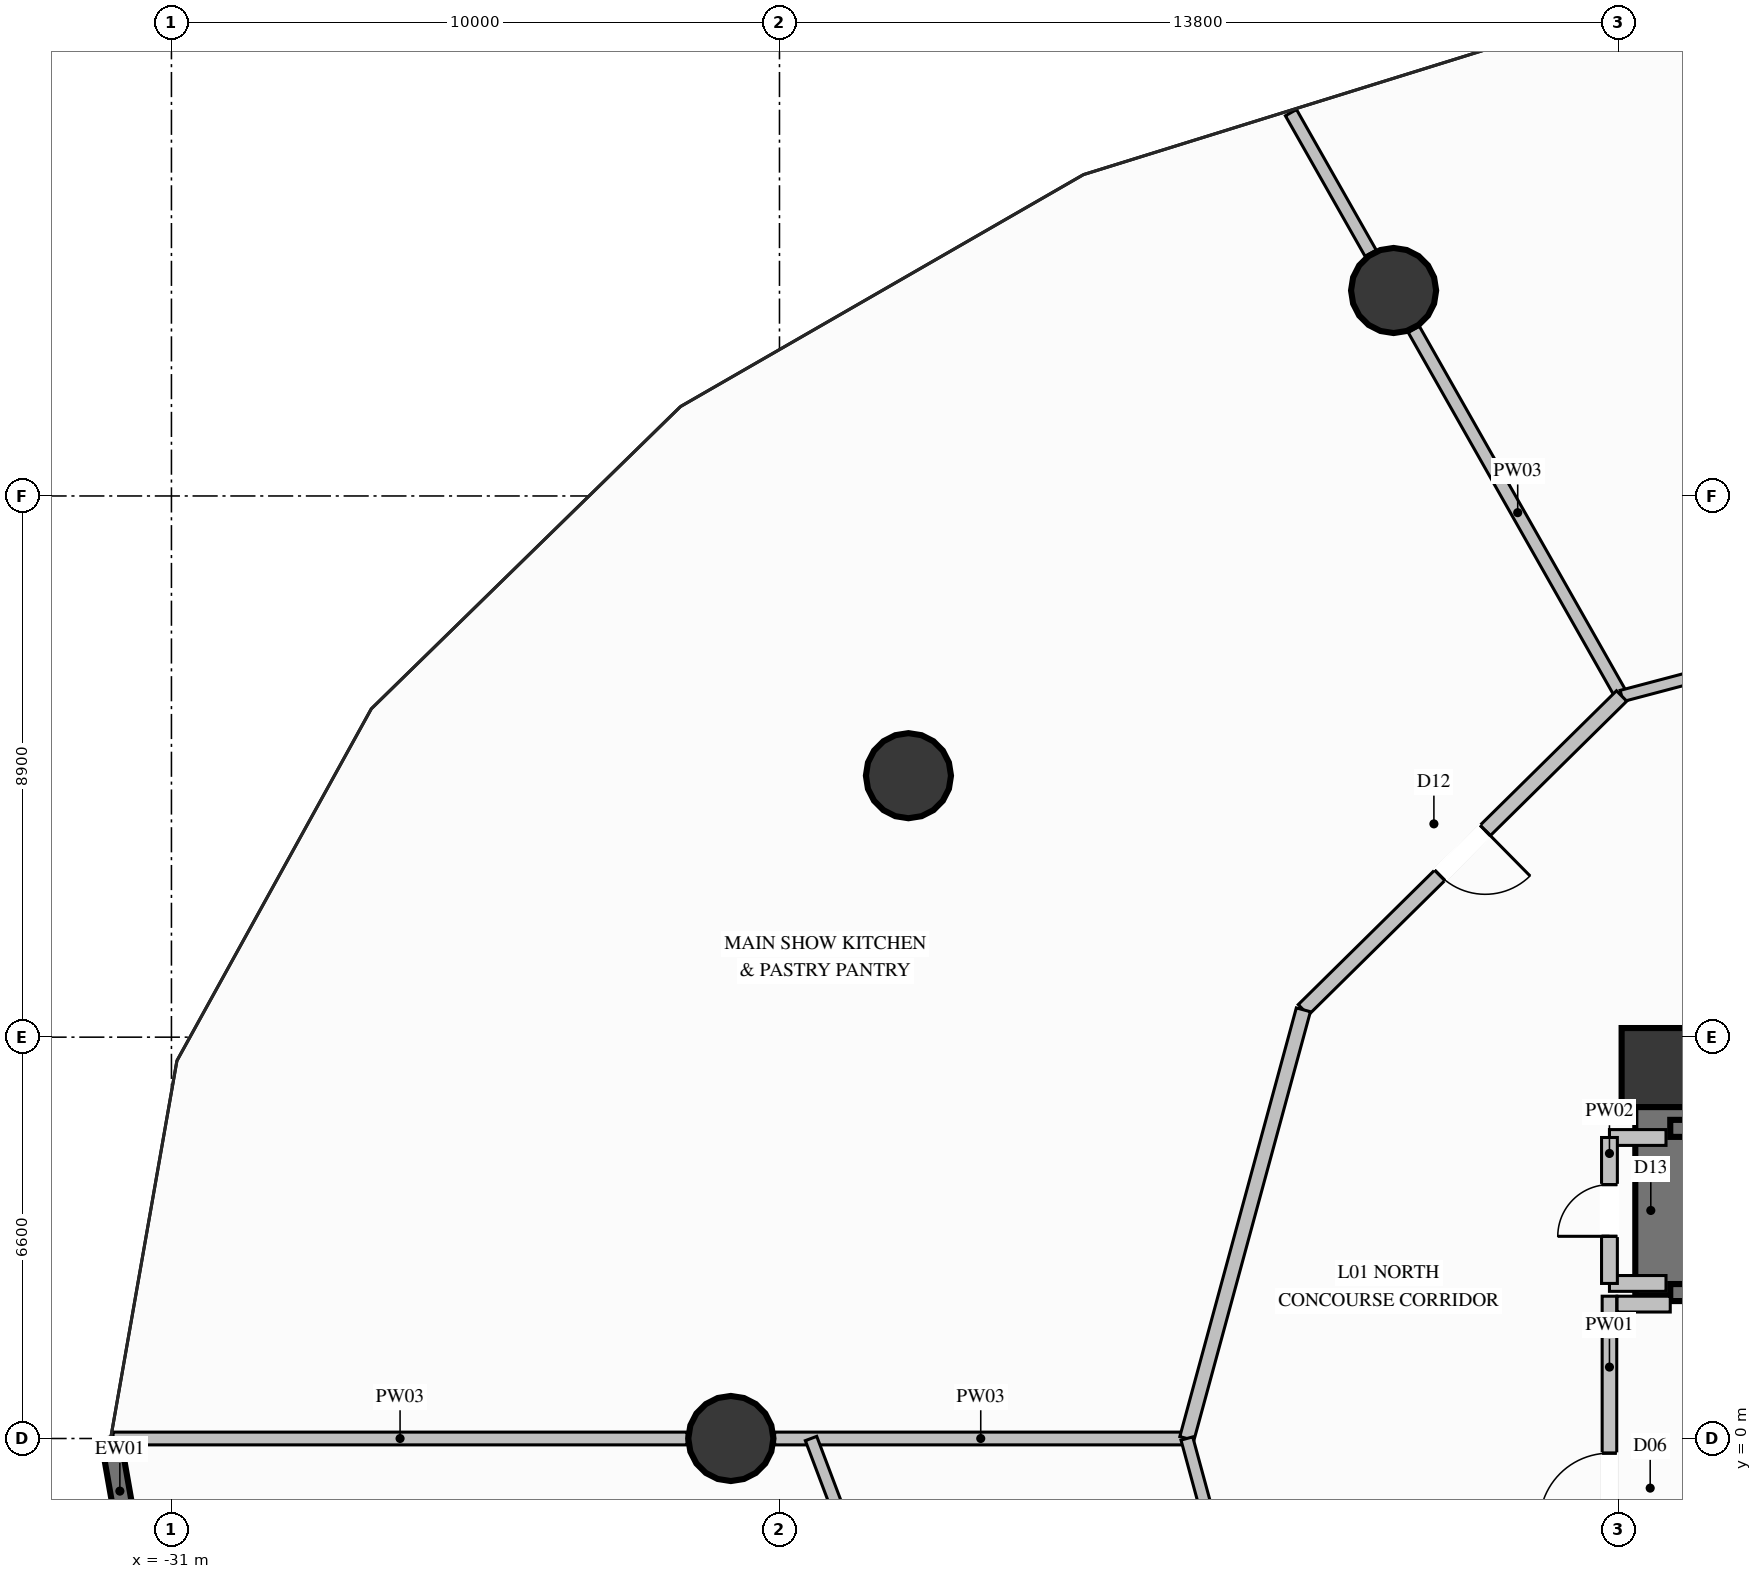
"""IFC4 building model, lengths in metres.
Left out: names, types, materials, properties, quantities, classifications, styles, units other than length and angle.
Written with IfcOpenShell. Run it as: python <this file> out.ifc"""

import sys

from ifc_helpers import new_model, si_unit, direction, frame, frame_2d, origin, origin_2d, place, context, subcontext, project, spatial, rectangle, circle, extrude, element, fill, save


model = new_model("IFC4")
c1 = context("Model", 3, precision=1e-05, world=origin(), true_north=direction((0.0, 1.0)))
c2 = subcontext(c1, "Body", "Model", "MODEL_VIEW")
j1 = project(units=[si_unit("LENGTHUNIT", "METRE"), si_unit("PLANEANGLEUNIT", "RADIAN")], contexts=[c1])
p1 = place(None, origin())
s1 = spatial("IfcSite", under=j1, at=p1, CompositionType="ELEMENT")
p2 = place(p1, origin())
s2 = spatial("IfcBuilding", under=s1, at=p2, CompositionType="ELEMENT")
p3 = place(p2, frame((0.0, 0.0, 7.2)))
s3 = spatial("IfcBuildingStorey", under=s2, at=p3, CompositionType="ELEMENT", Elevation=7.2)
p4 = place(p3, frame((-6.5, 6.1, 0.0), z_axis=(0.0, 0.0, 1.0), x_axis=(1.0, 0.0, 0.0)))
e1 = element("IfcColumn", 1, at=p4, inside=s3, PredefinedType="COLUMN", context=c2, shape_type="SweptSolid", body=[
    extrude(rectangle(XDim=1.3, YDim=1.3, at=origin_2d()), origin(), (0.0, 0.0, 1.0), 5.4),
])
p5 = place(p3, frame((-6.5, 2.35, 0.0), z_axis=(0.0, 0.0, 1.0), x_axis=(0.0, 1.0, 0.0)))
e2 = element("IfcWall", 2, at=p5, inside=s3, PredefinedType="SHEAR", context=c2, shape_type="SweptSolid", body=[
    extrude(rectangle(XDim=4.175, YDim=0.85, at=frame_2d((2.087, 0.0))), origin(), (0.0, 0.0, 1.0), 5.4),
])
for number, where, z_axis, x_axis in (
    (3, (-10.9, 18.879, 0.0), (0.0, 0.0, 1.0), (1.0, 0.0, 0.0)),
    (4, (-18.879, 10.9, 0.0), (0.0, 0.0, 1.0), (1.0, 0.0, 0.0)),
    (5, (-21.8, 0.0, 0.0), (0.0, 0.0, 1.0), (1.0, 0.0, 0.0)),
):
    element("IfcColumn", number, at=place(p3, frame(where, z_axis=z_axis, x_axis=x_axis)), inside=s3, PredefinedType="COLUMN", context=c2, shape_type="SweptSolid", body=[
        extrude(circle(Radius=0.7, at=origin_2d()), origin(), (0.0, 0.0, 1.0), 5.4),
    ])
p6 = place(p3, frame((-30.91, -6.212, 0.0), z_axis=(0.0, 0.0, 1.0), x_axis=(-0.172842303266, 0.984949510483, 0.0)))
e6 = element("IfcWall", 6, at=p6, inside=s3, PredefinedType="SOLIDWALL", context=c2, shape_type="SweptSolid", body=[
    extrude(rectangle(XDim=6.307, YDim=0.32, at=frame_2d((3.153, 0.0))), origin(), (0.0, 0.0, 1.0), 4.98),
])
p7 = place(p6, frame((1.9, 0.0, 0.65)))
e7 = element("IfcOpeningElement", 7, at=p7, cuts=e6, PredefinedType="OPENING", context=c2, shape_type="SweptSolid", body=[
    extrude(rectangle(XDim=2.4, YDim=3.2, at=frame_2d((1.2, 1.6))), frame((0.0, 0.17, 0.0), z_axis=(0.0, -1.0, 0.0), x_axis=(1.0, 0.0, 0.0)), (0.0, 0.0, 1.0), 0.34),
])
p8 = place(p3, frame((-6.35, 2.4, 0.0), z_axis=(0.0, 0.0, 1.0), x_axis=(1.0, 0.0, 0.0)))
e8 = element("IfcWall", 8, at=p8, inside=s3, PredefinedType="SOLIDWALL", context=c2, shape_type="SweptSolid", body=[
    extrude(rectangle(XDim=2.2, YDim=0.28, at=frame_2d((1.1, 0.0))), origin(), (0.0, 0.0, 1.0), 4.98),
])
p9 = place(p8, frame((0.5, 0.0, 0.0)))
e9 = element("IfcOpeningElement", 9, at=p9, cuts=e8, PredefinedType="OPENING", context=c2, shape_type="SweptSolid", body=[
    extrude(rectangle(XDim=1.2, YDim=2.2, at=frame_2d((0.6, 1.1))), frame((0.0, 0.15, 0.0), z_axis=(0.0, -1.0, 0.0), x_axis=(1.0, 0.0, 0.0)), (0.0, 0.0, 1.0), 0.3),
])
p10 = place(p3, frame((-4.15, 5.1, 0.0), z_axis=(0.0, 0.0, 1.0), x_axis=(-1.0, 0.0, 0.0)))
e10 = element("IfcWall", 10, at=p10, inside=s3, PredefinedType="SOLIDWALL", context=c2, shape_type="SweptSolid", body=[
    extrude(rectangle(XDim=2.2, YDim=0.28, at=frame_2d((1.1, 0.0))), origin(), (0.0, 0.0, 1.0), 4.98),
])
p11 = place(p3, frame((-7.35, -2.78, 0.0), z_axis=(0.0, 0.0, 1.0), x_axis=(0.0, 1.0, 0.0)))
e11 = element("IfcWall", 11, at=p11, inside=s3, PredefinedType="PARTITIONING", context=c2, shape_type="SweptSolid", body=[
    extrude(rectangle(XDim=5.12, YDim=0.24, at=frame_2d((2.56, 0.0))), origin(), (0.0, 0.0, 1.0), 3.865),
])
p12 = place(p11, frame((1.389, 0.0, 0.0)))
e12 = element("IfcOpeningElement", 12, at=p12, cuts=e11, PredefinedType="OPENING", context=c2, shape_type="SweptSolid", body=[
    extrude(rectangle(XDim=1.15, YDim=2.2, at=frame_2d((0.575, 1.1))), frame((0.0, 0.13, 0.0), z_axis=(0.0, -1.0, 0.0), x_axis=(1.0, 0.0, 0.0)), (0.0, 0.0, 1.0), 0.26),
])
p13 = place(p3, frame((-7.225, 2.21, 0.0), z_axis=(0.0, 0.0, 1.0), x_axis=(1.0, 0.0, 0.0)))
e13 = element("IfcWall", 13, at=p13, inside=s3, PredefinedType="PARTITIONING", context=c2, shape_type="SweptSolid", body=[
    extrude(rectangle(XDim=0.875, YDim=0.26, at=frame_2d((0.438, 0.0))), origin(), (0.0, 0.0, 1.0), 4.98),
])
for number, where, z_axis, x_axis in (
    (14, (-7.35, 4.95, 0.0), (0.0, 0.0, 1.0), (1.0, 0.0, 0.0)),
    (15, (-7.35, 2.55, 0.0), (0.0, 0.0, 1.0), (1.0, 0.0, 0.0)),
):
    element("IfcWall", number, at=place(p3, frame(where, z_axis=z_axis, x_axis=x_axis)), inside=s3, PredefinedType="PARTITIONING", context=c2, shape_type="SweptSolid", body=[
        extrude(rectangle(XDim=0.93, YDim=0.26, at=frame_2d((0.465, 0.0))), origin(), (0.0, 0.0, 1.0), 4.98),
    ])
p14 = place(p3, frame((-7.35, 2.55, 0.0), z_axis=(0.0, 0.0, 1.0), x_axis=(0.0, 1.0, 0.0)))
e16 = element("IfcWall", 16, at=p14, inside=s3, PredefinedType="PARTITIONING", context=c2, shape_type="SweptSolid", body=[
    extrude(rectangle(XDim=2.4, YDim=0.26, at=frame_2d((1.2, 0.0))), origin(), (0.0, 0.0, 1.0), 3.865),
])
p15 = place(p14, frame((0.775, 0.0, 0.0)))
e17 = element("IfcOpeningElement", 17, at=p15, cuts=e16, PredefinedType="OPENING", context=c2, shape_type="SweptSolid", body=[
    extrude(rectangle(XDim=0.85, YDim=2.05, at=frame_2d((0.425, 1.025))), frame((0.0, 0.14, 0.0), z_axis=(0.0, -1.0, 0.0), x_axis=(1.0, 0.0, 0.0)), (0.0, 0.0, 1.0), 0.28),
])
p16 = place(p3, frame((-7.15, 12.211, 0.0), z_axis=(0.0, 0.0, 1.0), x_axis=(-0.493203653226, 0.869913878752, 0.0)))
e18 = element("IfcWall", 18, at=p16, inside=s3, PredefinedType="PARTITIONING", context=c2, shape_type="SweptSolid", body=[
    extrude(rectangle(XDim=6.931, YDim=0.21, at=frame_2d((3.465, 0.0))), origin(), (0.0, 0.0, 1.0), 4.191),
])
p17 = place(p3, frame((-11.277, 19.492, 0.0), z_axis=(0.0, 0.0, 1.0), x_axis=(-0.493197981082, 0.869917094588, 0.0)))
e19 = element("IfcWall", 19, at=p17, inside=s3, PredefinedType="PARTITIONING", context=c2, shape_type="SweptSolid", body=[
    extrude(rectangle(XDim=2.658, YDim=0.21, at=frame_2d((1.329, 0.0))), origin(), (0.0, 0.0, 1.0), 4.98),
])
p18 = place(p3, frame((-14.3, 0.0, 0.0), z_axis=(0.0, 0.0, 1.0), x_axis=(-1.0, 0.0, 0.0)))
e20 = element("IfcWall", 20, at=p18, inside=s3, PredefinedType="PARTITIONING", context=c2, shape_type="SweptSolid", body=[
    extrude(rectangle(XDim=6.78, YDim=0.21, at=frame_2d((3.39, 0.0))), origin(), (0.0, 0.0, 1.0), 4.191),
])
p19 = place(p3, frame((-22.52, 0.0, 0.0), z_axis=(0.0, 0.0, 1.0), x_axis=(-1.0, 0.0, 0.0)))
e21 = element("IfcWall", 21, at=p19, inside=s3, PredefinedType="PARTITIONING", context=c2, shape_type="SweptSolid", body=[
    extrude(rectangle(XDim=9.44, YDim=0.21, at=frame_2d((4.72, 0.0))), origin(), (0.0, 0.0, 1.0), 4.98),
])
p20 = place(p3, frame((0.0, 14.1, 0.0), z_axis=(0.0, 0.0, 1.0), x_axis=(-0.966820901533, -0.255455170937, 0.0)))
e22 = element("IfcWall", 22, at=p20, inside=s3, PredefinedType="PARTITIONING", context=c2, shape_type="SweptSolid", body=[
    extrude(rectangle(XDim=7.395, YDim=0.19, at=frame_2d((3.698, 0.0))), origin(), (0.0, 0.0, 1.0), 4.558),
])
p21 = place(p3, frame((-7.15, 12.211, 0.0), z_axis=(0.0, 0.0, 1.0), x_axis=(-0.712071304345, -0.702107155303, 0.0)))
e23 = element("IfcWall", 23, at=p21, inside=s3, PredefinedType="PARTITIONING", context=c2, shape_type="SweptSolid", body=[
    extrude(rectangle(XDim=7.351, YDim=0.24, at=frame_2d((3.675, 0.0))), origin(), (0.0, 0.0, 1.0), 4.98),
])
p22 = place(p21, frame((3.15, 0.0, 0.0)))
e24 = element("IfcOpeningElement", 24, at=p22, cuts=e23, PredefinedType="OPENING", context=c2, shape_type="SweptSolid", body=[
    extrude(rectangle(XDim=1.05, YDim=2.15, at=frame_2d((0.525, 1.075))), frame((0.0, 0.13, 0.0), z_axis=(0.0, -1.0, 0.0), x_axis=(1.0, 0.0, 0.0)), (0.0, 0.0, 1.0), 0.26),
])
p23 = place(p3, frame((-12.384, 7.05, 0.0), z_axis=(0.0, 0.0, 1.0), x_axis=(-0.262260528785, -0.964997106235, 0.0)))
e25 = element("IfcWall", 25, at=p23, inside=s3, PredefinedType="PARTITIONING", context=c2, shape_type="SweptSolid", body=[
    extrude(rectangle(XDim=7.306, YDim=0.24, at=frame_2d((3.653, 0.0))), origin(), (0.0, 0.0, 1.0), 4.98),
])
p24 = place(p3, frame((-14.3, 0.0, 0.0), z_axis=(0.0, 0.0, 1.0), x_axis=(0.262250045558, -0.964999955236, 0.0)))
e26 = element("IfcWall", 26, at=p24, inside=s3, PredefinedType="PLUMBINGWALL", context=c2, shape_type="SweptSolid", body=[
    extrude(rectangle(XDim=3.287, YDim=0.2, at=frame_2d((1.644, 0.0))), origin(), (0.0, 0.0, 1.0), 4.98),
])
p25 = place(p24, frame((1.194, 0.0, 0.0)))
e27 = element("IfcOpeningElement", 27, at=p25, cuts=e26, PredefinedType="OPENING", context=c2, shape_type="SweptSolid", body=[
    extrude(rectangle(XDim=0.9, YDim=2.1, at=frame_2d((0.45, 1.05))), frame((0.0, 0.11, 0.0), z_axis=(0.0, -1.0, 0.0), x_axis=(1.0, 0.0, 0.0)), (0.0, 0.0, 1.0), 0.22),
])
p26 = place(p3, frame((-20.481, 0.0, 0.0), z_axis=(0.0, 0.0, 1.0), x_axis=(0.353110214666, -0.93558173149, 0.0)))
e28 = element("IfcWall", 28, at=p26, inside=s3, PredefinedType="PLUMBINGWALL", context=c2, shape_type="SweptSolid", body=[
    extrude(rectangle(XDim=4.644, YDim=0.2, at=frame_2d((2.322, 0.0))), origin(), (0.0, 0.0, 1.0), 4.98),
])
p27 = place(p12, origin())
e29 = element("IfcDoor", 29, at=p27, inside=s3, OperationType="SINGLE_SWING_LEFT", PredefinedType="DOOR", context=c2, shape_type="SweptSolid", body=[
    extrude(rectangle(XDim=1.15, YDim=2.2, at=frame_2d((0.575, 1.1))), frame((0.0, 0.025, 0.0), z_axis=(0.0, -1.0, 0.0), x_axis=(1.0, 0.0, 0.0)), (0.0, 0.0, 1.0), 0.05),
])
fill(e12, e29)
p28 = place(p15, origin())
e30 = element("IfcDoor", 30, at=p28, inside=s3, OperationType="SINGLE_SWING_LEFT", PredefinedType="DOOR", context=c2, shape_type="SweptSolid", body=[
    extrude(rectangle(XDim=0.85, YDim=2.05, at=frame_2d((0.425, 1.025))), frame((0.0, 0.025, 0.0), z_axis=(0.0, -1.0, 0.0), x_axis=(1.0, 0.0, 0.0)), (0.0, 0.0, 1.0), 0.05),
])
fill(e17, e30)
p29 = place(p22, origin())
e31 = element("IfcDoor", 31, at=p29, inside=s3, OperationType="SINGLE_SWING_LEFT", PredefinedType="DOOR", context=c2, shape_type="SweptSolid", body=[
    extrude(rectangle(XDim=1.05, YDim=2.15, at=frame_2d((0.525, 1.075))), frame((0.0, 0.025, 0.0), z_axis=(0.0, -1.0, 0.0), x_axis=(1.0, 0.0, 0.0)), (0.0, 0.0, 1.0), 0.05),
])
fill(e24, e31)
save(model, sys.argv[1])
